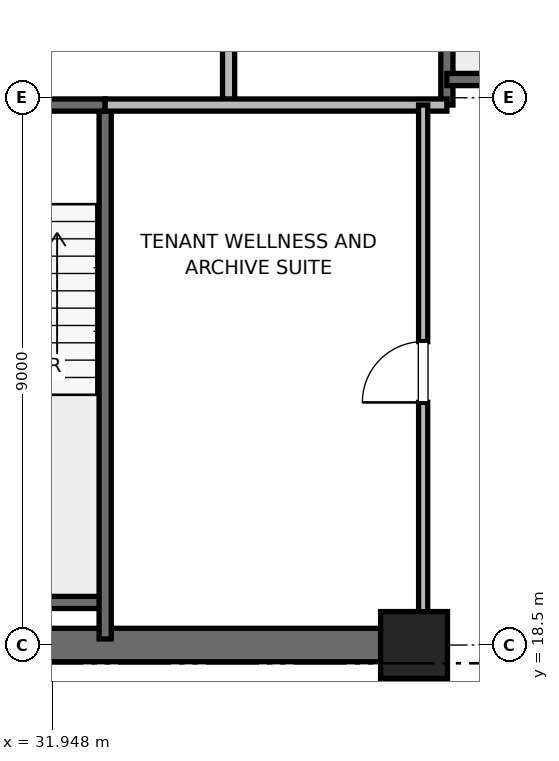
"""IFC4 building model, lengths in metres.
Left out: names, types, materials, properties, quantities, classifications, styles, units other than length and angle.
Written with IfcOpenShell. Run it as: python <this file> out.ifc"""

import sys

from ifc_helpers import new_model, si_unit, direction, frame, frame_2d, origin, origin_2d, place, context, subcontext, project, spatial, rectangle, extrude, element, fill, save


model = new_model("IFC4")
c1 = context("Model", 3, precision=1e-05, world=origin(), true_north=direction((0.0, 1.0)))
c2 = subcontext(c1, "Body", "Model", "MODEL_VIEW")
j1 = project(units=[si_unit("LENGTHUNIT", "METRE"), si_unit("PLANEANGLEUNIT", "RADIAN")], contexts=[c1])
p1 = place(None, origin())
s1 = spatial("IfcSite", under=j1, at=p1, CompositionType="ELEMENT")
p2 = place(p1, origin())
s2 = spatial("IfcBuilding", under=s1, at=p2, CompositionType="ELEMENT")
p3 = place(p2, frame((0.0, 0.0, 164.4)))
s3 = spatial("IfcBuildingStorey", under=s2, at=p3, CompositionType="ELEMENT", Elevation=164.4)
p4 = place(p3, frame((37.9, 18.5, 0.0), z_axis=(0.0, 0.0, 1.0), x_axis=(1.0, 0.0, 0.0)))
e1 = element("IfcColumn", 1, at=p4, inside=s3, PredefinedType="PILASTER", context=c2, shape_type="SweptSolid", body=[
    extrude(rectangle(XDim=1.1, YDim=1.1, at=origin_2d()), origin(), (0.0, 0.0, 1.0), 4.0),
])
p5 = place(p3, frame((29.0, 18.5, 0.0), z_axis=(0.0, 0.0, 1.0), x_axis=(1.0, 0.0, 0.0)))
e2 = element("IfcWall", 2, at=p5, inside=s3, PredefinedType="SHEAR", context=c2, shape_type="SweptSolid", body=[
    extrude(rectangle(XDim=9.2, YDim=0.55, at=frame_2d((4.6, 0.0))), origin(), (0.0, 0.0, 1.0), 3.775),
])
p6 = place(p3, frame((29.7, 19.2, 0.0), z_axis=(0.0, 0.0, 1.0), x_axis=(1.0, 0.0, 0.0)))
e3 = element("IfcWall", 3, at=p6, inside=s3, PredefinedType="SOLIDWALL", context=c2, shape_type="SweptSolid", body=[
    extrude(rectangle(XDim=3.12, YDim=0.2, at=frame_2d((1.56, 0.0))), origin(), (0.0, 0.0, 1.0), 3.775),
])
p7 = place(p3, frame((32.82, 18.6, 0.0), z_axis=(0.0, 0.0, 1.0), x_axis=(0.0, 1.0, 0.0)))
e4 = element("IfcWall", 4, at=p7, inside=s3, PredefinedType="SOLIDWALL", context=c2, shape_type="SweptSolid", body=[
    extrude(rectangle(XDim=8.78, YDim=0.2, at=frame_2d((4.39, 0.0))), origin(), (0.0, 0.0, 1.0), 3.775),
])
p8 = place(p3, frame((29.7, 27.38, 0.0), z_axis=(0.0, 0.0, 1.0), x_axis=(1.0, 0.0, 0.0)))
e5 = element("IfcWall", 5, at=p8, inside=s3, PredefinedType="SOLIDWALL", context=c2, shape_type="SweptSolid", body=[
    extrude(rectangle(XDim=3.12, YDim=0.2, at=frame_2d((1.56, 0.0))), origin(), (0.0, 0.0, 1.0), 3.775),
])
p9 = place(p8, frame((1.01, 0.0, 0.0)))
e6 = element("IfcOpeningElement", 6, at=p9, cuts=e5, PredefinedType="OPENING", context=c2, shape_type="SweptSolid", body=[
    extrude(rectangle(XDim=1.1, YDim=2.15, at=frame_2d((0.55, 1.075))), frame((0.0, 0.1, 0.0), z_axis=(0.0, -1.0, 0.0), x_axis=(1.0, 0.0, 0.0)), (0.0, 0.0, 1.0), 0.2),
])
p10 = place(p3, frame((38.44, 27.38, 0.0), z_axis=(0.0, 0.0, 1.0), x_axis=(0.0, 1.0, 0.0)))
e7 = element("IfcWall", 7, at=p10, inside=s3, PredefinedType="SOLIDWALL", context=c2, shape_type="SweptSolid", body=[
    extrude(rectangle(XDim=8.87, YDim=0.2, at=frame_2d((4.435, 0.0))), origin(), (0.0, 0.0, 1.0), 3.775),
])
p11 = place(p3, frame((38.44, 27.8, 0.0), z_axis=(0.0, 0.0, 1.0), x_axis=(1.0, 0.0, 0.0)))
e8 = element("IfcWall", 8, at=p11, inside=s3, PredefinedType="SOLIDWALL", context=c2, shape_type="SweptSolid", body=[
    extrude(rectangle(XDim=3.32, YDim=0.2, at=frame_2d((1.66, 0.0))), origin(), (0.0, 0.0, 1.0), 3.775),
])
p12 = place(p3, frame((34.85, 27.38, 0.0), z_axis=(0.0, 0.0, 1.0), x_axis=(0.0, 1.0, 0.0)))
e9 = element("IfcWall", 9, at=p12, inside=s3, PredefinedType="PARTITIONING", context=c2, shape_type="SweptSolid", body=[
    extrude(rectangle(XDim=3.37, YDim=0.2, at=frame_2d((1.685, 0.0))), origin(), (0.0, 0.0, 1.0), 3.775),
])
p13 = place(p12, frame((1.11, 0.0, 0.0)))
e10 = element("IfcOpeningElement", 10, at=p13, cuts=e9, PredefinedType="OPENING", context=c2, shape_type="SweptSolid", body=[
    extrude(rectangle(XDim=1.15, YDim=2.2, at=frame_2d((0.575, 1.1))), frame((0.0, 0.1, 0.0), z_axis=(0.0, -1.0, 0.0), x_axis=(1.0, 0.0, 0.0)), (0.0, 0.0, 1.0), 0.2),
])
p14 = place(p3, frame((32.82, 27.38, 0.0), z_axis=(0.0, 0.0, 1.0), x_axis=(1.0, 0.0, 0.0)))
e11 = element("IfcWall", 11, at=p14, inside=s3, PredefinedType="PARTITIONING", context=c2, shape_type="SweptSolid", body=[
    extrude(rectangle(XDim=5.62, YDim=0.2, at=frame_2d((2.81, 0.0))), origin(), (0.0, 0.0, 1.0), 3.775),
])
p15 = place(p3, frame((38.05, 18.6, 0.0), z_axis=(0.0, 0.0, 1.0), x_axis=(0.0, 1.0, 0.0)))
e12 = element("IfcWall", 12, at=p15, inside=s3, PredefinedType="PARTITIONING", context=c2, shape_type="SweptSolid", body=[
    extrude(rectangle(XDim=8.78, YDim=0.15, at=frame_2d((4.39, 0.0))), origin(), (0.0, 0.0, 1.0), 2.755),
])
p16 = place(p15, frame((3.89, 0.0, 0.0)))
e13 = element("IfcOpeningElement", 13, at=p16, cuts=e12, PredefinedType="OPENING", context=c2, shape_type="SweptSolid", body=[
    extrude(rectangle(XDim=1.0, YDim=2.15, at=frame_2d((0.5, 1.075))), frame((0.0, 0.075, 0.0), z_axis=(0.0, -1.0, 0.0), x_axis=(1.0, 0.0, 0.0)), (0.0, 0.0, 1.0), 0.15),
])
p17 = place(p16, origin())
e14 = element("IfcDoor", 14, at=p17, inside=s3, OperationType="SINGLE_SWING_LEFT", PredefinedType="DOOR", context=c2, shape_type="SweptSolid", body=[
    extrude(rectangle(XDim=1.0, YDim=2.15, at=frame_2d((0.5, 1.075))), frame((0.0, 0.025, 0.0), z_axis=(0.0, -1.0, 0.0), x_axis=(1.0, 0.0, 0.0)), (0.0, 0.0, 1.0), 0.05),
])
fill(e13, e14)
save(model, sys.argv[1])
